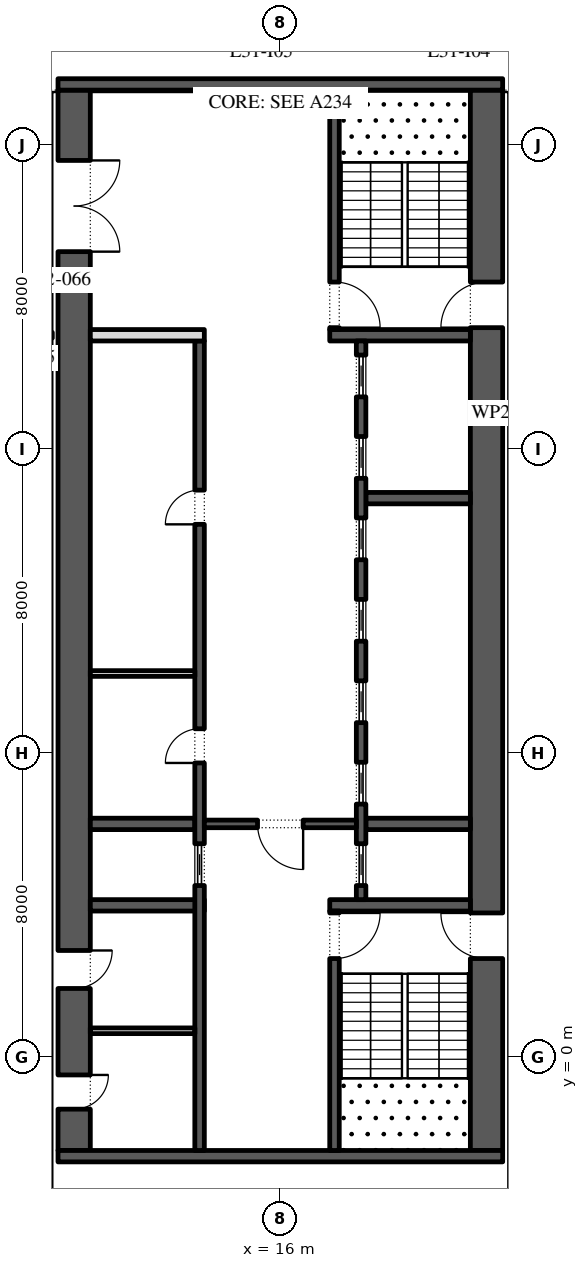
"""IFC4 building model, lengths in metres.
Left out: names, types, materials, properties, quantities, classifications, styles, units other than length and angle.
Written with IfcOpenShell. Run it as: python <this file> out.ifc"""

import sys

from ifc_helpers import new_model, si_unit, direction, frame, frame_2d, origin, place, context, subcontext, project, spatial, rectangle, extrude, element, fill, save


model = new_model("IFC4")
c1 = context("Model", 3, precision=1e-05, world=origin(), true_north=direction((0.0, 1.0)))
c2 = subcontext(c1, "Body", "Model", "MODEL_VIEW")
j1 = project(units=[si_unit("LENGTHUNIT", "METRE"), si_unit("PLANEANGLEUNIT", "RADIAN")], contexts=[c1])
p1 = place(None, origin())
s1 = spatial("IfcSite", under=j1, at=p1, CompositionType="ELEMENT")
p2 = place(p1, origin())
s2 = spatial("IfcBuilding", under=s1, at=p2, CompositionType="ELEMENT")
p3 = place(p2, frame((0.0, 0.0, 143.4)))
s3 = spatial("IfcBuildingStorey", under=s2, at=p3, CompositionType="ELEMENT", Elevation=143.4)
p4 = place(p3, frame((21.425, -2.45, 0.0), z_axis=(0.0, 0.0, 1.0), x_axis=(0.0, 1.0, 0.0)))
e1 = element("IfcWall", 1, at=p4, inside=s3, PredefinedType="SHEAR", context=c2, shape_type="SweptSolid", body=[
    extrude(rectangle(XDim=27.9, YDim=0.85, at=frame_2d((13.95, 0.0))), origin(), (0.0, 0.0, 1.0), 4.0),
])
p5 = place(p4, frame((5.05, 0.0, 0.0)))
e2 = element("IfcOpeningElement", 2, at=p5, cuts=e1, PredefinedType="OPENING", context=c2, shape_type="SweptSolid", body=[
    extrude(rectangle(XDim=1.2, YDim=2.1, at=frame_2d((0.6, 1.05))), frame((0.0, 0.435, 0.0), z_axis=(0.0, -1.0, 0.0), x_axis=(1.0, 0.0, 0.0)), (0.0, 0.0, 1.0), 0.87),
])
p6 = place(p4, frame((21.65, 0.0, 0.0)))
e3 = element("IfcOpeningElement", 3, at=p6, cuts=e1, PredefinedType="OPENING", context=c2, shape_type="SweptSolid", body=[
    extrude(rectangle(XDim=1.2, YDim=2.1, at=frame_2d((0.6, 1.05))), frame((0.0, 0.435, 0.0), z_axis=(0.0, -1.0, 0.0), x_axis=(1.0, 0.0, 0.0)), (0.0, 0.0, 1.0), 0.87),
])
p7 = place(p3, frame((10.575, -2.45, 0.0), z_axis=(0.0, 0.0, 1.0), x_axis=(0.0, 1.0, 0.0)))
e4 = element("IfcWall", 4, at=p7, inside=s3, PredefinedType="SHEAR", context=c2, shape_type="SweptSolid", body=[
    extrude(rectangle(XDim=27.9, YDim=0.85, at=frame_2d((13.95, 0.0))), origin(), (0.0, 0.0, 1.0), 4.0),
])
p8 = place(p7, frame((23.65, 0.0, 0.0)))
e5 = element("IfcOpeningElement", 5, at=p8, cuts=e4, PredefinedType="OPENING", context=c2, shape_type="SweptSolid", body=[
    extrude(rectangle(XDim=2.4, YDim=2.1, at=frame_2d((1.2, 1.05))), frame((0.0, 0.435, 0.0), z_axis=(0.0, -1.0, 0.0), x_axis=(1.0, 0.0, 0.0)), (0.0, 0.0, 1.0), 0.87),
])
p9 = place(p7, frame((1.087, 0.0, 0.0)))
e6 = element("IfcOpeningElement", 6, at=p9, cuts=e4, PredefinedType="OPENING", context=c2, shape_type="SweptSolid", body=[
    extrude(rectangle(XDim=0.9, YDim=2.1, at=frame_2d((0.45, 1.05))), frame((0.0, 0.435, 0.0), z_axis=(0.0, -1.0, 0.0), x_axis=(1.0, 0.0, 0.0)), (0.0, 0.0, 1.0), 0.87),
])
p10 = place(p7, frame((4.262, 0.0, 0.0)))
e7 = element("IfcOpeningElement", 7, at=p10, cuts=e4, PredefinedType="OPENING", context=c2, shape_type="SweptSolid", body=[
    extrude(rectangle(XDim=1.0, YDim=2.1, at=frame_2d((0.5, 1.05))), frame((0.0, 0.435, 0.0), z_axis=(0.0, -1.0, 0.0), x_axis=(1.0, 0.0, 0.0)), (0.0, 0.0, 1.0), 0.87),
])
for number, where, z_axis, x_axis in (
    (8, (10.15, -2.6, 0.0), (0.0, 0.0, 1.0), (1.0, 0.0, 0.0)),
    (9, (10.15, 25.6, 0.0), (0.0, 0.0, 1.0), (1.0, 0.0, 0.0)),
):
    element("IfcWall", number, at=place(p3, frame(where, z_axis=z_axis, x_axis=x_axis)), inside=s3, PredefinedType="SHEAR", context=c2, shape_type="SweptSolid", body=[
        extrude(rectangle(XDim=11.7, YDim=0.3, at=frame_2d((5.85, 0.0))), origin(), (0.0, 0.0, 1.0), 4.0),
    ])
p11 = place(p3, frame((17.3, 4.0, 0.0), z_axis=(0.0, 0.0, 1.0), x_axis=(1.0, 0.0, 0.0)))
e10 = element("IfcWall", 10, at=p11, inside=s3, PredefinedType="SHEAR", context=c2, shape_type="SweptSolid", body=[
    extrude(rectangle(XDim=3.7, YDim=0.3, at=frame_2d((1.85, 0.0))), origin(), (0.0, 0.0, 1.0), 4.0),
])
p12 = place(p3, frame((17.425, -2.45, 0.0), z_axis=(0.0, 0.0, 1.0), x_axis=(0.0, 1.0, 0.0)))
e11 = element("IfcWall", 11, at=p12, inside=s3, PredefinedType="SHEAR", context=c2, shape_type="SweptSolid", body=[
    extrude(rectangle(XDim=6.3, YDim=0.25, at=frame_2d((3.15, 0.0))), origin(), (0.0, 0.0, 1.0), 4.0),
])
p13 = place(p12, frame((5.05, 0.0, 0.0)))
e12 = element("IfcOpeningElement", 12, at=p13, cuts=e11, PredefinedType="OPENING", context=c2, shape_type="SweptSolid", body=[
    extrude(rectangle(XDim=1.2, YDim=2.1, at=frame_2d((0.6, 1.05))), frame((0.0, 0.135, 0.0), z_axis=(0.0, -1.0, 0.0), x_axis=(1.0, 0.0, 0.0)), (0.0, 0.0, 1.0), 0.27),
])
p14 = place(p3, frame((17.3, 19.0, 0.0), z_axis=(0.0, 0.0, 1.0), x_axis=(1.0, 0.0, 0.0)))
e13 = element("IfcWall", 13, at=p14, inside=s3, PredefinedType="SHEAR", context=c2, shape_type="SweptSolid", body=[
    extrude(rectangle(XDim=3.7, YDim=0.3, at=frame_2d((1.85, 0.0))), origin(), (0.0, 0.0, 1.0), 4.0),
])
p15 = place(p3, frame((17.425, 19.15, 0.0), z_axis=(0.0, 0.0, 1.0), x_axis=(0.0, 1.0, 0.0)))
e14 = element("IfcWall", 14, at=p15, inside=s3, PredefinedType="SHEAR", context=c2, shape_type="SweptSolid", body=[
    extrude(rectangle(XDim=6.3, YDim=0.25, at=frame_2d((3.15, 0.0))), origin(), (0.0, 0.0, 1.0), 4.0),
])
p16 = place(p15, frame((0.05, 0.0, 0.0)))
e15 = element("IfcOpeningElement", 15, at=p16, cuts=e14, PredefinedType="OPENING", context=c2, shape_type="SweptSolid", body=[
    extrude(rectangle(XDim=1.2, YDim=2.1, at=frame_2d((0.6, 1.05))), frame((0.0, 0.135, 0.0), z_axis=(0.0, -1.0, 0.0), x_axis=(1.0, 0.0, 0.0)), (0.0, 0.0, 1.0), 0.27),
])
for number, where, z_axis, x_axis in (
    (16, (18.25, 6.143, 0.0), (0.0, 0.0, 1.0), (1.0, 0.0, 0.0)),
    (17, (18.25, 14.714, 0.0), (0.0, 0.0, 1.0), (1.0, 0.0, 0.0)),
):
    element("IfcWall", number, at=place(p3, frame(where, z_axis=z_axis, x_axis=x_axis)), inside=s3, PredefinedType="SHEAR", context=c2, shape_type="SweptSolid", body=[
        extrude(rectangle(XDim=2.75, YDim=0.3, at=frame_2d((1.375, 0.0))), origin(), (0.0, 0.0, 1.0), 4.0),
    ])
p17 = place(p3, frame((18.125, 4.15, 0.0), z_axis=(0.0, 0.0, 1.0), x_axis=(0.0, 1.0, 0.0)))
e18 = element("IfcWall", 18, at=p17, inside=s3, PredefinedType="SHEAR", context=c2, shape_type="SweptSolid", body=[
    extrude(rectangle(XDim=14.7, YDim=0.25, at=frame_2d((7.35, 0.0))), origin(), (0.0, 0.0, 1.0), 4.0),
])
p18 = place(p17, frame((0.371, 0.0, 0.0)))
e19 = element("IfcOpeningElement", 19, at=p18, cuts=e18, PredefinedType="OPENING", context=c2, shape_type="SweptSolid", body=[
    extrude(rectangle(XDim=1.1, YDim=2.1, at=frame_2d((0.55, 1.05))), frame((0.0, 0.135, 0.0), z_axis=(0.0, -1.0, 0.0), x_axis=(1.0, 0.0, 0.0)), (0.0, 0.0, 1.0), 0.27),
])
p19 = place(p17, frame((2.514, 0.0, 0.0)))
e20 = element("IfcOpeningElement", 20, at=p19, cuts=e18, PredefinedType="OPENING", context=c2, shape_type="SweptSolid", body=[
    extrude(rectangle(XDim=1.1, YDim=2.1, at=frame_2d((0.55, 1.05))), frame((0.0, 0.135, 0.0), z_axis=(0.0, -1.0, 0.0), x_axis=(1.0, 0.0, 0.0)), (0.0, 0.0, 1.0), 0.27),
])
p20 = place(p17, frame((4.657, 0.0, 0.0)))
e21 = element("IfcOpeningElement", 21, at=p20, cuts=e18, PredefinedType="OPENING", context=c2, shape_type="SweptSolid", body=[
    extrude(rectangle(XDim=1.1, YDim=2.1, at=frame_2d((0.55, 1.05))), frame((0.0, 0.135, 0.0), z_axis=(0.0, -1.0, 0.0), x_axis=(1.0, 0.0, 0.0)), (0.0, 0.0, 1.0), 0.27),
])
p21 = place(p17, frame((6.8, 0.0, 0.0)))
e22 = element("IfcOpeningElement", 22, at=p21, cuts=e18, PredefinedType="OPENING", context=c2, shape_type="SweptSolid", body=[
    extrude(rectangle(XDim=1.1, YDim=2.1, at=frame_2d((0.55, 1.05))), frame((0.0, 0.135, 0.0), z_axis=(0.0, -1.0, 0.0), x_axis=(1.0, 0.0, 0.0)), (0.0, 0.0, 1.0), 0.27),
])
p22 = place(p17, frame((8.943, 0.0, 0.0)))
e23 = element("IfcOpeningElement", 23, at=p22, cuts=e18, PredefinedType="OPENING", context=c2, shape_type="SweptSolid", body=[
    extrude(rectangle(XDim=1.1, YDim=2.1, at=frame_2d((0.55, 1.05))), frame((0.0, 0.135, 0.0), z_axis=(0.0, -1.0, 0.0), x_axis=(1.0, 0.0, 0.0)), (0.0, 0.0, 1.0), 0.27),
])
p23 = place(p17, frame((11.086, 0.0, 0.0)))
e24 = element("IfcOpeningElement", 24, at=p23, cuts=e18, PredefinedType="OPENING", context=c2, shape_type="SweptSolid", body=[
    extrude(rectangle(XDim=1.1, YDim=2.1, at=frame_2d((0.55, 1.05))), frame((0.0, 0.135, 0.0), z_axis=(0.0, -1.0, 0.0), x_axis=(1.0, 0.0, 0.0)), (0.0, 0.0, 1.0), 0.27),
])
p24 = place(p17, frame((13.229, 0.0, 0.0)))
e25 = element("IfcOpeningElement", 25, at=p24, cuts=e18, PredefinedType="OPENING", context=c2, shape_type="SweptSolid", body=[
    extrude(rectangle(XDim=1.1, YDim=2.1, at=frame_2d((0.55, 1.05))), frame((0.0, 0.135, 0.0), z_axis=(0.0, -1.0, 0.0), x_axis=(1.0, 0.0, 0.0)), (0.0, 0.0, 1.0), 0.27),
])
p25 = place(p3, frame((11.0, 4.0, 0.0), z_axis=(0.0, 0.0, 1.0), x_axis=(1.0, 0.0, 0.0)))
e26 = element("IfcWall", 26, at=p25, inside=s3, PredefinedType="SHEAR", context=c2, shape_type="SweptSolid", body=[
    extrude(rectangle(XDim=3.0, YDim=0.3, at=frame_2d((1.5, 0.0))), origin(), (0.0, 0.0, 1.0), 4.0),
])
p26 = place(p3, frame((11.0, 6.143, 0.0), z_axis=(0.0, 0.0, 1.0), x_axis=(1.0, 0.0, 0.0)))
e27 = element("IfcWall", 27, at=p26, inside=s3, PredefinedType="SHEAR", context=c2, shape_type="SweptSolid", body=[
    extrude(rectangle(XDim=2.75, YDim=0.3, at=frame_2d((1.375, 0.0))), origin(), (0.0, 0.0, 1.0), 4.0),
])
p27 = place(p3, frame((13.875, -2.45, 0.0), z_axis=(0.0, 0.0, 1.0), x_axis=(0.0, 1.0, 0.0)))
e28 = element("IfcWall", 28, at=p27, inside=s3, PredefinedType="SHEAR", context=c2, shape_type="SweptSolid", body=[
    extrude(rectangle(XDim=21.3, YDim=0.25, at=frame_2d((10.65, 0.0))), origin(), (0.0, 0.0, 1.0), 4.0),
])
p28 = place(p27, frame((10.196, 0.0, 0.0)))
e29 = element("IfcOpeningElement", 29, at=p28, cuts=e28, PredefinedType="OPENING", context=c2, shape_type="SweptSolid", body=[
    extrude(rectangle(XDim=0.9, YDim=2.1, at=frame_2d((0.45, 1.05))), frame((0.0, 0.135, 0.0), z_axis=(0.0, -1.0, 0.0), x_axis=(1.0, 0.0, 0.0)), (0.0, 0.0, 1.0), 0.27),
])
p29 = place(p27, frame((16.475, 0.0, 0.0)))
e30 = element("IfcOpeningElement", 30, at=p29, cuts=e28, PredefinedType="OPENING", context=c2, shape_type="SweptSolid", body=[
    extrude(rectangle(XDim=0.9, YDim=2.1, at=frame_2d((0.45, 1.05))), frame((0.0, 0.135, 0.0), z_axis=(0.0, -1.0, 0.0), x_axis=(1.0, 0.0, 0.0)), (0.0, 0.0, 1.0), 0.27),
])
p30 = place(p27, frame((6.971, 0.0, 0.0)))
e31 = element("IfcOpeningElement", 31, at=p30, cuts=e28, PredefinedType="OPENING", context=c2, shape_type="SweptSolid", body=[
    extrude(rectangle(XDim=1.1, YDim=2.1, at=frame_2d((0.55, 1.05))), frame((0.0, 0.135, 0.0), z_axis=(0.0, -1.0, 0.0), x_axis=(1.0, 0.0, 0.0)), (0.0, 0.0, 1.0), 0.27),
])
p31 = place(p3, frame((11.0, 19.0, 0.0), z_axis=(0.0, 0.0, 1.0), x_axis=(1.0, 0.0, 0.0)))
e32 = element("IfcWall", 32, at=p31, inside=s3, PredefinedType="PARTITIONING", context=c2, shape_type="SweptSolid", body=[
    extrude(rectangle(XDim=3.0, YDim=0.3, at=frame_2d((1.5, 0.0))), origin(), (0.0, 0.0, 1.0), 4.0),
])
p32 = place(p3, frame((11.0, 10.1, 0.0), z_axis=(0.0, 0.0, 1.0), x_axis=(1.0, 0.0, 0.0)))
e33 = element("IfcWall", 33, at=p32, inside=s3, PredefinedType="PARTITIONING", context=c2, shape_type="SweptSolid", body=[
    extrude(rectangle(XDim=2.75, YDim=0.15, at=frame_2d((1.375, 0.0))), origin(), (0.0, 0.0, 1.0), 4.0),
])
p33 = place(p3, frame((14.0, 6.143, 0.0), z_axis=(0.0, 0.0, 1.0), x_axis=(1.0, 0.0, 0.0)))
e34 = element("IfcWall", 34, at=p33, inside=s3, PredefinedType="SHEAR", context=c2, shape_type="SweptSolid", body=[
    extrude(rectangle(XDim=4.0, YDim=0.2, at=frame_2d((2.0, 0.0))), origin(), (0.0, 0.0, 1.0), 4.0),
])
p34 = place(p33, frame((1.4, 0.0, 0.0)))
e35 = element("IfcOpeningElement", 35, at=p34, cuts=e34, PredefinedType="OPENING", context=c2, shape_type="SweptSolid", body=[
    extrude(rectangle(XDim=1.2, YDim=2.1, at=frame_2d((0.6, 1.05))), frame((0.0, 0.11, 0.0), z_axis=(0.0, -1.0, 0.0), x_axis=(1.0, 0.0, 0.0)), (0.0, 0.0, 1.0), 0.22),
])
p35 = place(p3, frame((11.0, 0.7, 0.0), z_axis=(0.0, 0.0, 1.0), x_axis=(1.0, 0.0, 0.0)))
e36 = element("IfcWall", 36, at=p35, inside=s3, PredefinedType="PARTITIONING", context=c2, shape_type="SweptSolid", body=[
    extrude(rectangle(XDim=2.75, YDim=0.15, at=frame_2d((1.375, 0.0))), origin(), (0.0, 0.0, 1.0), 4.0),
])
p36 = place(p18, origin())
e37 = element("IfcDoor", 37, at=p36, inside=s3, OperationType="SLIDING_TO_LEFT", PredefinedType="DOOR", context=c2, shape_type="SweptSolid", body=[
    extrude(rectangle(XDim=1.1, YDim=2.1, at=frame_2d((0.55, 1.05))), frame((0.0, 0.025, 0.0), z_axis=(0.0, -1.0, 0.0), x_axis=(1.0, 0.0, 0.0)), (0.0, 0.0, 1.0), 0.05),
])
fill(e19, e37)
p37 = place(p19, origin())
e38 = element("IfcDoor", 38, at=p37, inside=s3, OperationType="SLIDING_TO_LEFT", PredefinedType="DOOR", context=c2, shape_type="SweptSolid", body=[
    extrude(rectangle(XDim=1.1, YDim=2.1, at=frame_2d((0.55, 1.05))), frame((0.0, 0.025, 0.0), z_axis=(0.0, -1.0, 0.0), x_axis=(1.0, 0.0, 0.0)), (0.0, 0.0, 1.0), 0.05),
])
fill(e20, e38)
p38 = place(p20, origin())
e39 = element("IfcDoor", 39, at=p38, inside=s3, OperationType="SLIDING_TO_LEFT", PredefinedType="DOOR", context=c2, shape_type="SweptSolid", body=[
    extrude(rectangle(XDim=1.1, YDim=2.1, at=frame_2d((0.55, 1.05))), frame((0.0, 0.025, 0.0), z_axis=(0.0, -1.0, 0.0), x_axis=(1.0, 0.0, 0.0)), (0.0, 0.0, 1.0), 0.05),
])
fill(e21, e39)
p39 = place(p21, origin())
e40 = element("IfcDoor", 40, at=p39, inside=s3, OperationType="SLIDING_TO_LEFT", PredefinedType="DOOR", context=c2, shape_type="SweptSolid", body=[
    extrude(rectangle(XDim=1.1, YDim=2.1, at=frame_2d((0.55, 1.05))), frame((0.0, 0.025, 0.0), z_axis=(0.0, -1.0, 0.0), x_axis=(1.0, 0.0, 0.0)), (0.0, 0.0, 1.0), 0.05),
])
fill(e22, e40)
p40 = place(p22, origin())
e41 = element("IfcDoor", 41, at=p40, inside=s3, OperationType="SLIDING_TO_LEFT", PredefinedType="DOOR", context=c2, shape_type="SweptSolid", body=[
    extrude(rectangle(XDim=1.1, YDim=2.1, at=frame_2d((0.55, 1.05))), frame((0.0, 0.025, 0.0), z_axis=(0.0, -1.0, 0.0), x_axis=(1.0, 0.0, 0.0)), (0.0, 0.0, 1.0), 0.05),
])
fill(e23, e41)
p41 = place(p23, origin())
e42 = element("IfcDoor", 42, at=p41, inside=s3, OperationType="SLIDING_TO_LEFT", PredefinedType="DOOR", context=c2, shape_type="SweptSolid", body=[
    extrude(rectangle(XDim=1.1, YDim=2.1, at=frame_2d((0.55, 1.05))), frame((0.0, 0.025, 0.0), z_axis=(0.0, -1.0, 0.0), x_axis=(1.0, 0.0, 0.0)), (0.0, 0.0, 1.0), 0.05),
])
fill(e24, e42)
p42 = place(p24, origin())
e43 = element("IfcDoor", 43, at=p42, inside=s3, OperationType="SLIDING_TO_LEFT", PredefinedType="DOOR", context=c2, shape_type="SweptSolid", body=[
    extrude(rectangle(XDim=1.1, YDim=2.1, at=frame_2d((0.55, 1.05))), frame((0.0, 0.025, 0.0), z_axis=(0.0, -1.0, 0.0), x_axis=(1.0, 0.0, 0.0)), (0.0, 0.0, 1.0), 0.05),
])
fill(e25, e43)
p43 = place(p28, origin())
e44 = element("IfcDoor", 44, at=p43, inside=s3, OperationType="SINGLE_SWING_RIGHT", PredefinedType="DOOR", context=c2, shape_type="SweptSolid", body=[
    extrude(rectangle(XDim=0.9, YDim=2.1, at=frame_2d((0.45, 1.05))), frame((0.0, 0.125, 0.0), z_axis=(0.0, -1.0, 0.0), x_axis=(1.0, 0.0, 0.0)), (0.0, 0.0, 1.0), 0.05),
])
fill(e29, e44)
p44 = place(p29, origin())
e45 = element("IfcDoor", 45, at=p44, inside=s3, OperationType="SINGLE_SWING_RIGHT", PredefinedType="DOOR", context=c2, shape_type="SweptSolid", body=[
    extrude(rectangle(XDim=0.9, YDim=2.1, at=frame_2d((0.45, 1.05))), frame((0.0, 0.125, 0.0), z_axis=(0.0, -1.0, 0.0), x_axis=(1.0, 0.0, 0.0)), (0.0, 0.0, 1.0), 0.05),
])
fill(e30, e45)
p45 = place(p30, origin())
e46 = element("IfcDoor", 46, at=p45, inside=s3, OperationType="SLIDING_TO_LEFT", PredefinedType="DOOR", context=c2, shape_type="SweptSolid", body=[
    extrude(rectangle(XDim=1.1, YDim=2.1, at=frame_2d((0.55, 1.05))), frame((0.0, 0.025, 0.0), z_axis=(0.0, -1.0, 0.0), x_axis=(1.0, 0.0, 0.0)), (0.0, 0.0, 1.0), 0.05),
])
fill(e31, e46)
p46 = place(p34, frame((1.2, 0.0, 0.0), z_axis=(0.0, 0.0, 1.0), x_axis=(-1.0, 0.0, 0.0)))
e47 = element("IfcDoor", 47, at=p46, inside=s3, OperationType="SINGLE_SWING_RIGHT", PredefinedType="DOOR", context=c2, shape_type="SweptSolid", body=[
    extrude(rectangle(XDim=1.2, YDim=2.1, at=frame_2d((0.6, 1.05))), frame((0.0, 0.025, 0.0), z_axis=(0.0, -1.0, 0.0), x_axis=(1.0, 0.0, 0.0)), (0.0, 0.0, 1.0), 0.05),
])
fill(e35, e47)
p47 = place(p8, frame((2.4, 0.0, 0.0), z_axis=(0.0, 0.0, 1.0), x_axis=(-1.0, 0.0, 0.0)))
e48 = element("IfcDoor", 48, at=p47, inside=s3, OperationType="DOUBLE_DOOR_SINGLE_SWING", PredefinedType="DOOR", context=c2, shape_type="SweptSolid", body=[
    extrude(rectangle(XDim=2.4, YDim=2.1, at=frame_2d((1.2, 1.05))), frame((0.0, 0.025, 0.0), z_axis=(0.0, -1.0, 0.0), x_axis=(1.0, 0.0, 0.0)), (0.0, 0.0, 1.0), 0.05),
])
fill(e5, e48)
p48 = place(p13, frame((1.2, 0.0, 0.0), z_axis=(0.0, 0.0, 1.0), x_axis=(-1.0, 0.0, 0.0)))
e49 = element("IfcDoor", 49, at=p48, inside=s3, OperationType="SINGLE_SWING_RIGHT", PredefinedType="DOOR", context=c2, shape_type="SweptSolid", body=[
    extrude(rectangle(XDim=1.2, YDim=2.1, at=frame_2d((0.6, 1.05))), frame((0.0, 0.025, 0.0), z_axis=(0.0, -1.0, 0.0), x_axis=(1.0, 0.0, 0.0)), (0.0, 0.0, 1.0), 0.05),
])
fill(e12, e49)
p49 = place(p5, origin())
e50 = element("IfcDoor", 50, at=p49, inside=s3, OperationType="SINGLE_SWING_LEFT", PredefinedType="DOOR", context=c2, shape_type="SweptSolid", body=[
    extrude(rectangle(XDim=1.2, YDim=2.1, at=frame_2d((0.6, 1.05))), frame((0.0, 0.025, 0.0), z_axis=(0.0, -1.0, 0.0), x_axis=(1.0, 0.0, 0.0)), (0.0, 0.0, 1.0), 0.05),
])
fill(e2, e50)
p50 = place(p16, frame((1.2, 0.0, 0.0), z_axis=(0.0, 0.0, 1.0), x_axis=(-1.0, 0.0, 0.0)))
e51 = element("IfcDoor", 51, at=p50, inside=s3, OperationType="SINGLE_SWING_LEFT", PredefinedType="DOOR", context=c2, shape_type="SweptSolid", body=[
    extrude(rectangle(XDim=1.2, YDim=2.1, at=frame_2d((0.6, 1.05))), frame((0.0, 0.025, 0.0), z_axis=(0.0, -1.0, 0.0), x_axis=(1.0, 0.0, 0.0)), (0.0, 0.0, 1.0), 0.05),
])
fill(e15, e51)
p51 = place(p6, origin())
e52 = element("IfcDoor", 52, at=p51, inside=s3, OperationType="SINGLE_SWING_RIGHT", PredefinedType="DOOR", context=c2, shape_type="SweptSolid", body=[
    extrude(rectangle(XDim=1.2, YDim=2.1, at=frame_2d((0.6, 1.05))), frame((0.0, 0.025, 0.0), z_axis=(0.0, -1.0, 0.0), x_axis=(1.0, 0.0, 0.0)), (0.0, 0.0, 1.0), 0.05),
])
fill(e3, e52)
p52 = place(p9, frame((0.9, -0.8, 0.0), z_axis=(0.0, 0.0, 1.0), x_axis=(-1.0, 0.0, 0.0)))
e53 = element("IfcDoor", 53, at=p52, inside=s3, OperationType="SINGLE_SWING_RIGHT", PredefinedType="DOOR", context=c2, shape_type="SweptSolid", body=[
    extrude(rectangle(XDim=0.9, YDim=2.1, at=frame_2d((0.45, 1.05))), frame((0.0, -0.375, 0.0), z_axis=(0.0, -1.0, 0.0), x_axis=(1.0, 0.0, 0.0)), (0.0, 0.0, 1.0), 0.05),
])
fill(e6, e53)
p53 = place(p10, frame((1.0, -0.8, 0.0), z_axis=(0.0, 0.0, 1.0), x_axis=(-1.0, 0.0, 0.0)))
e54 = element("IfcDoor", 54, at=p53, inside=s3, OperationType="SINGLE_SWING_RIGHT", PredefinedType="DOOR", context=c2, shape_type="SweptSolid", body=[
    extrude(rectangle(XDim=1.0, YDim=2.1, at=frame_2d((0.5, 1.05))), frame((0.0, -0.375, 0.0), z_axis=(0.0, -1.0, 0.0), x_axis=(1.0, 0.0, 0.0)), (0.0, 0.0, 1.0), 0.05),
])
fill(e7, e54)
save(model, sys.argv[1])
